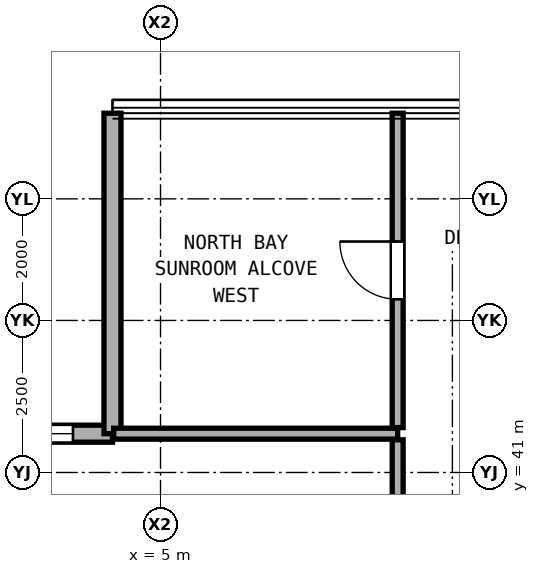
"""IFC4 building model, lengths in metres.
Left out: names, types, materials, properties, quantities, classifications, styles, units other than length and angle.
Written with IfcOpenShell. Run it as: python <this file> out.ifc"""

import sys

from ifc_helpers import new_model, si_unit, direction, frame, frame_2d, origin, place, context, subcontext, project, spatial, rectangle, extrude, element, fill, save


model = new_model("IFC4")
c1 = context("Model", 3, precision=1e-05, world=origin(), true_north=direction((0.0, 1.0)))
c2 = subcontext(c1, "Body", "Model", "MODEL_VIEW")
j1 = project(units=[si_unit("LENGTHUNIT", "METRE"), si_unit("PLANEANGLEUNIT", "RADIAN")], contexts=[c1])
p1 = place(None, origin())
s1 = spatial("IfcSite", under=j1, at=p1, CompositionType="ELEMENT")
p2 = place(p1, origin())
s2 = spatial("IfcBuilding", under=s1, at=p2, CompositionType="ELEMENT")
p3 = place(p2, frame((0.0, 0.0, 137.9)))
s3 = spatial("IfcBuildingStorey", under=s2, at=p3, CompositionType="ELEMENT", Elevation=137.9)
p4 = place(p3, frame((4.21, 41.638, 0.0), z_axis=(0.0, 0.0, 1.0), x_axis=(-1.0, 0.0, 0.0)))
e1 = element("IfcWall", 1, at=p4, inside=s3, PredefinedType="SOLIDWALL", context=c2, shape_type="SweptSolid", body=[
    extrude(rectangle(XDim=5.27, YDim=0.28, at=frame_2d((2.635, 0.0))), origin(), (0.0, 0.0, 1.0), 3.06),
])
p5 = place(p4, frame((0.65, 0.0, 0.85)))
e2 = element("IfcOpeningElement", 2, at=p5, cuts=e1, PredefinedType="OPENING", context=c2, shape_type="SweptSolid", body=[
    extrude(rectangle(XDim=1.1, YDim=2.0, at=frame_2d((0.55, 1.0))), frame((0.0, 0.15, 0.0), z_axis=(0.0, -1.0, 0.0), x_axis=(1.0, 0.0, 0.0)), (0.0, 0.0, 1.0), 0.3),
])
p6 = place(p3, frame((4.21, 46.908, 0.0), z_axis=(0.0, 0.0, 1.0), x_axis=(0.0, -1.0, 0.0)))
e3 = element("IfcWall", 3, at=p6, inside=s3, PredefinedType="SOLIDWALL", context=c2, shape_type="SweptSolid", body=[
    extrude(rectangle(XDim=5.27, YDim=0.28, at=frame_2d((2.635, 0.0))), origin(), (0.0, 0.0, 1.0), 3.06),
])
p7 = place(p3, frame((4.23, 41.638, 0.0), z_axis=(0.0, 0.0, 1.0), x_axis=(1.0, 0.0, 0.0)))
e4 = element("IfcWall", 4, at=p7, inside=s3, PredefinedType="PARTITIONING", context=c2, shape_type="SweptSolid", body=[
    extrude(rectangle(XDim=4.67, YDim=0.18, at=frame_2d((2.335, 0.0))), origin(), (0.0, 0.0, 1.0), 3.08),
])
p8 = place(p3, frame((8.9, 30.82, 0.0), z_axis=(0.0, 0.0, 1.0), x_axis=(0.0, 1.0, 0.0)))
e5 = element("IfcWall", 5, at=p8, inside=s3, PredefinedType="PARTITIONING", context=c2, shape_type="SweptSolid", body=[
    extrude(rectangle(XDim=10.718, YDim=0.18, at=frame_2d((5.359, 0.0))), origin(), (0.0, 0.0, 1.0), 2.299),
])
p9 = place(p8, frame((4.834, 0.0, 0.0)))
e6 = element("IfcOpeningElement", 6, at=p9, cuts=e5, PredefinedType="OPENING", context=c2, shape_type="SweptSolid", body=[
    extrude(rectangle(XDim=1.05, YDim=2.2, at=frame_2d((0.525, 1.1))), frame((0.0, 0.1, 0.0), z_axis=(0.0, -1.0, 0.0), x_axis=(1.0, 0.0, 0.0)), (0.0, 0.0, 1.0), 0.2),
])
p10 = place(p3, frame((8.9, 41.738, 0.0), z_axis=(0.0, 0.0, 1.0), x_axis=(0.0, 1.0, 0.0)))
e7 = element("IfcWall", 7, at=p10, inside=s3, PredefinedType="PARTITIONING", context=c2, shape_type="SweptSolid", body=[
    extrude(rectangle(XDim=5.17, YDim=0.18, at=frame_2d((2.585, 0.0))), origin(), (0.0, 0.0, 1.0), 3.08),
])
p11 = place(p10, frame((2.11, 0.0, 0.0)))
e8 = element("IfcOpeningElement", 8, at=p11, cuts=e7, PredefinedType="OPENING", context=c2, shape_type="SweptSolid", body=[
    extrude(rectangle(XDim=0.95, YDim=2.15, at=frame_2d((0.475, 1.075))), frame((0.0, 0.1, 0.0), z_axis=(0.0, -1.0, 0.0), x_axis=(1.0, 0.0, 0.0)), (0.0, 0.0, 1.0), 0.2),
])
p12 = place(p5, origin())
e9 = element("IfcWindow", 9, at=p12, inside=s3, PartitioningType="SINGLE_PANEL", PredefinedType="WINDOW", context=c2, shape_type="SweptSolid", body=[
    extrude(rectangle(XDim=1.1, YDim=2.0, at=frame_2d((0.55, 1.0))), frame((0.0, 0.03, 0.0), z_axis=(0.0, -1.0, 0.0), x_axis=(1.0, 0.0, 0.0)), (0.0, 0.0, 1.0), 0.06),
])
fill(e2, e9)
p13 = place(p11, origin())
e10 = element("IfcDoor", 10, at=p13, inside=s3, OperationType="SINGLE_SWING_RIGHT", PredefinedType="DOOR", context=c2, shape_type="SweptSolid", body=[
    extrude(rectangle(XDim=0.95, YDim=2.15, at=frame_2d((0.475, 1.075))), frame((0.0, 0.025, 0.0), z_axis=(0.0, -1.0, 0.0), x_axis=(1.0, 0.0, 0.0)), (0.0, 0.0, 1.0), 0.05),
])
fill(e8, e10)
save(model, sys.argv[1])
